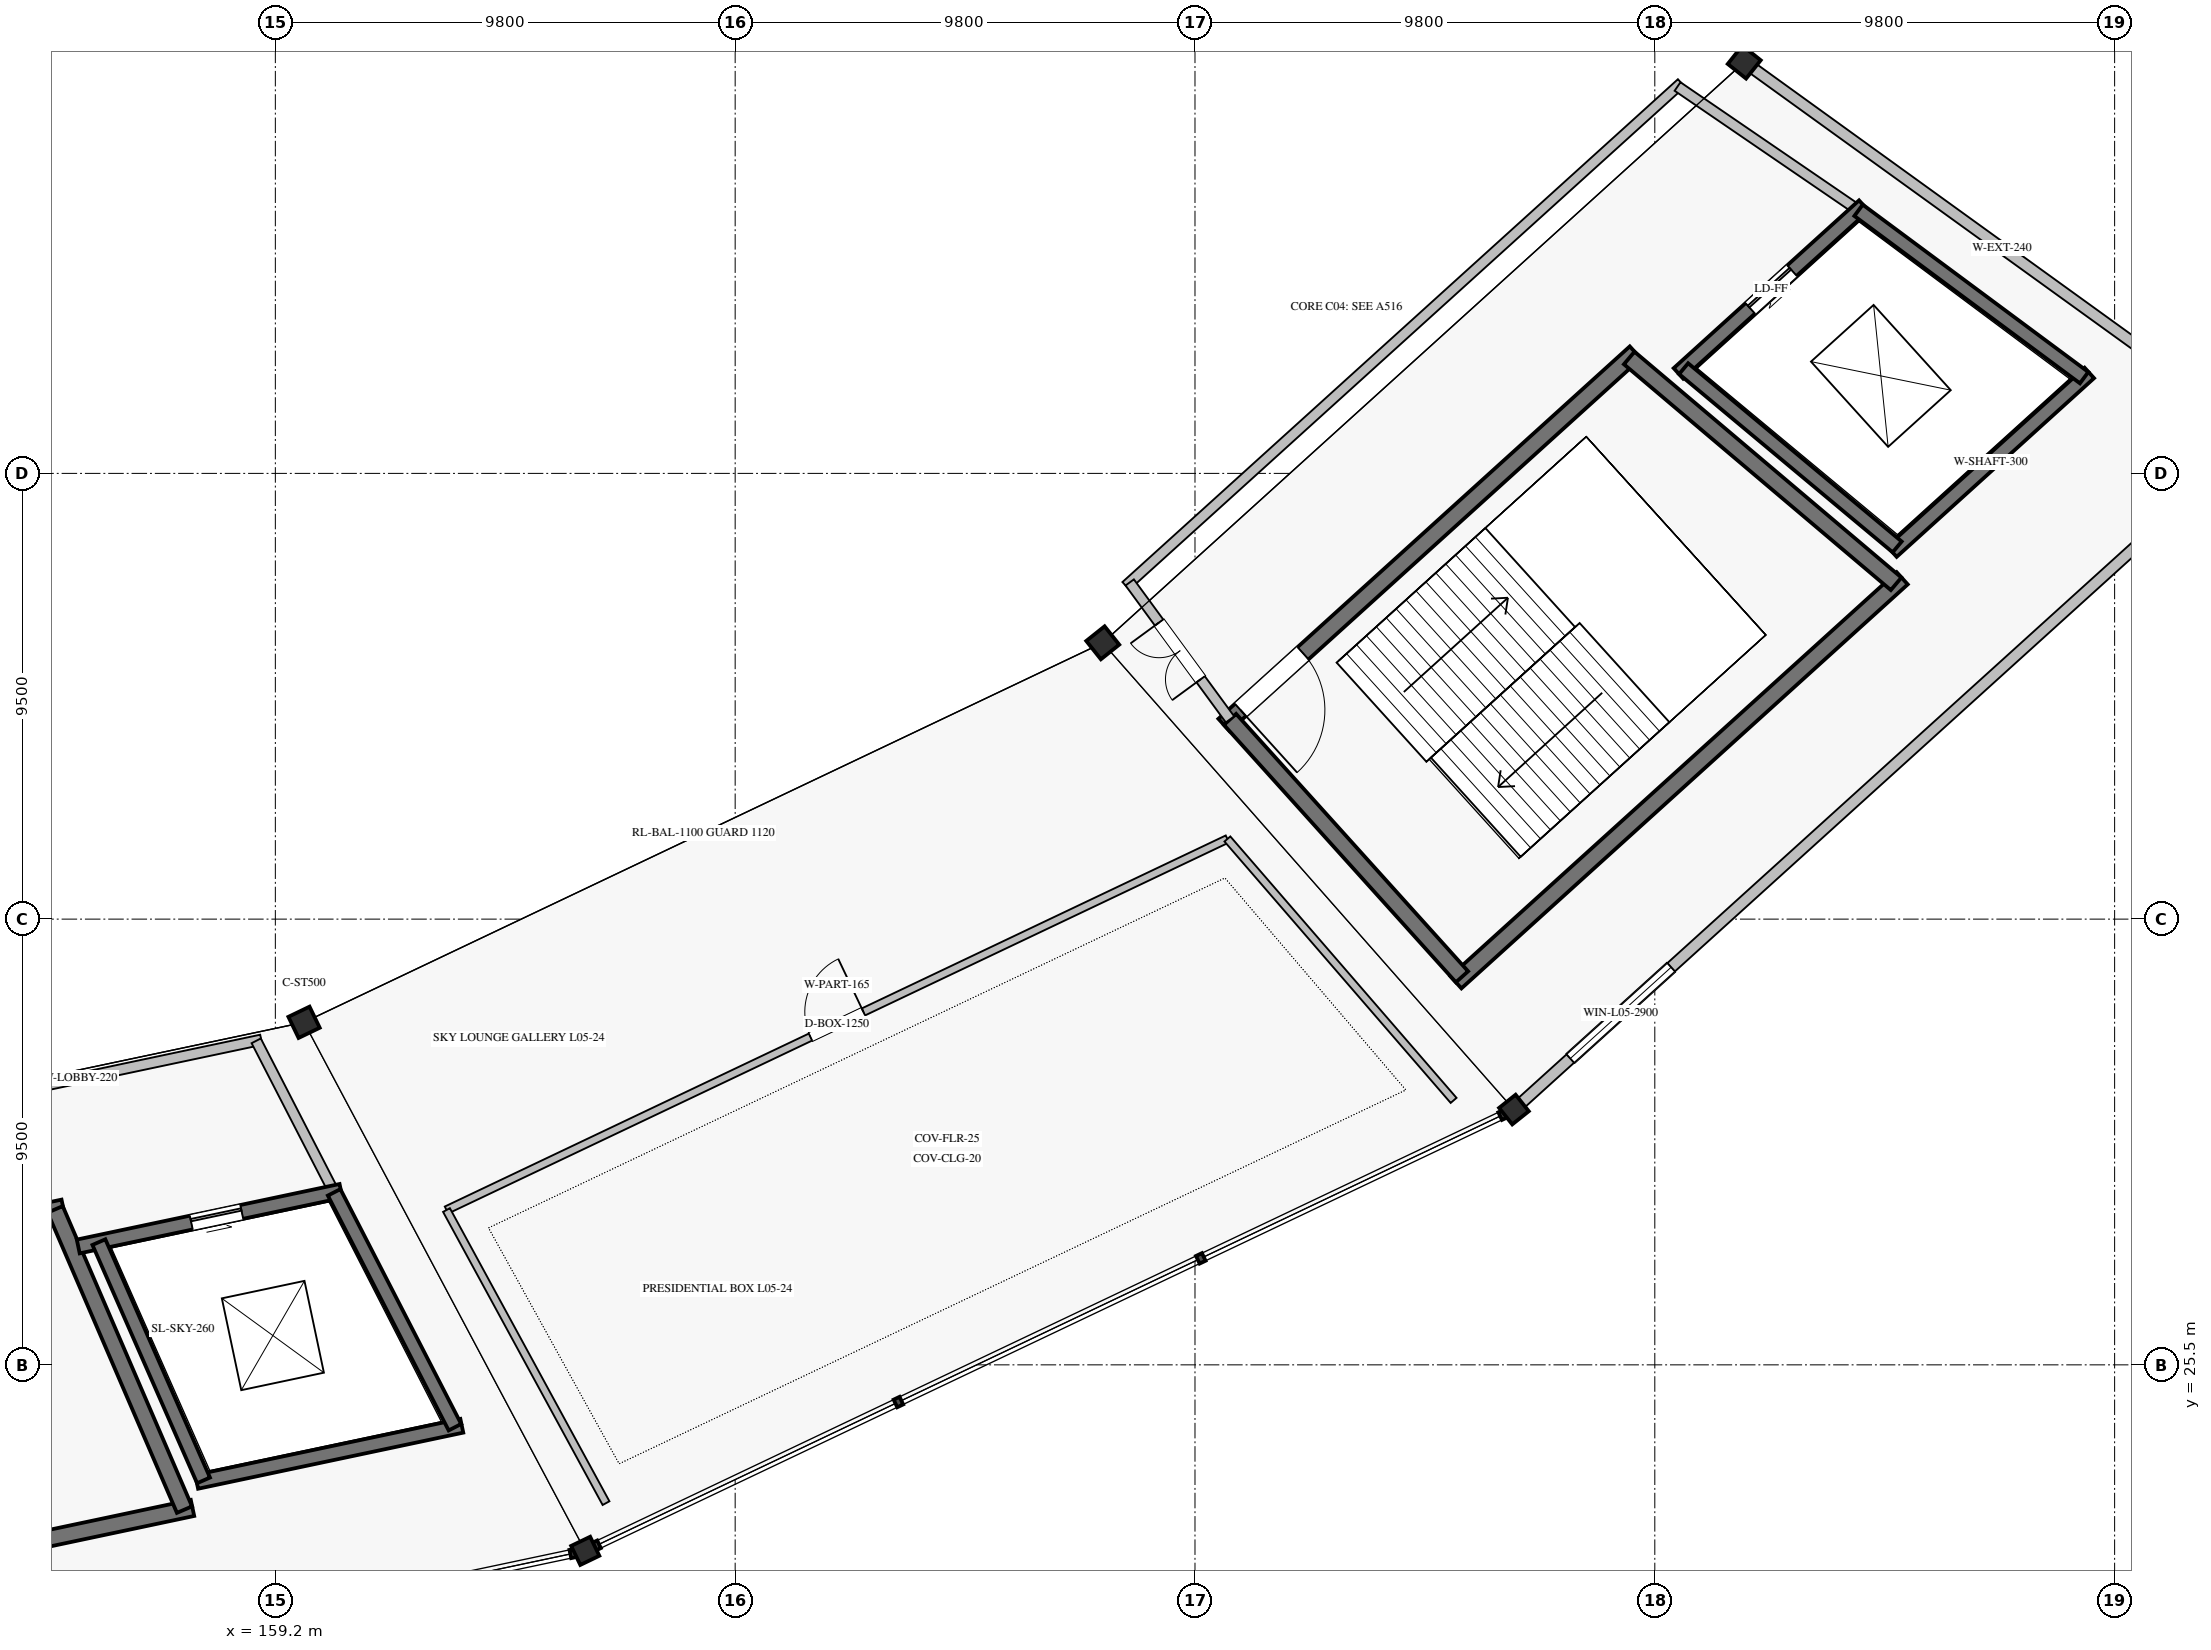
"""IFC4 building model, lengths in metres.
Left out: names, types, materials, properties, quantities, classifications, styles, units other than length and angle.
Written with IfcOpenShell. Run it as: python <this file> out.ifc"""

import sys

from ifc_helpers import new_model, si_unit, direction, frame, frame_2d, origin, origin_2d, place, context, subcontext, project, spatial, rectangle, hollow_rectangle, extrude, element, fill, save


model = new_model("IFC4")
c1 = context("Model", 3, precision=1e-05, world=origin(), true_north=direction((0.0, 1.0)))
c2 = subcontext(c1, "Body", "Model", "MODEL_VIEW")
j1 = project(units=[si_unit("LENGTHUNIT", "METRE"), si_unit("PLANEANGLEUNIT", "RADIAN")], contexts=[c1])
p1 = place(None, origin())
s1 = spatial("IfcSite", under=j1, at=p1, CompositionType="ELEMENT")
p2 = place(p1, origin())
s2 = spatial("IfcBuilding", under=s1, at=p2, CompositionType="ELEMENT")
p3 = place(p2, frame((0.0, 0.0, 25.84)))
s3 = spatial("IfcBuildingStorey", under=s2, at=p3, CompositionType="ELEMENT", Elevation=25.84)
for number, where, z_axis, x_axis in (
    (1, (159.812, 32.801, 0.0), (0.0, 0.0, 1.0), (0.434, -0.901, 0.0)),
    (2, (176.834, 40.889, 0.0), (0.0, 0.0, 1.0), (0.623, -0.782, 0.0)),
    (3, (190.506, 53.266, 0.0), (0.0, 0.0, 1.0), (0.782, -0.623, 0.0)),
):
    element("IfcColumn", number, at=place(p3, frame(where, z_axis=z_axis, x_axis=x_axis)), inside=s3, PredefinedType="COLUMN", context=c2, shape_type="SweptSolid", body=[
        extrude(hollow_rectangle(XDim=0.5, YDim=0.5, WallThickness=0.022, at=origin_2d()), origin(), (0.0, 0.0, 1.0), 5.44),
    ])
for number, where, z_axis, x_axis in (
    (4, (165.805, 21.536, 0.0), (0.0, 0.0, 1.0), (0.434, -0.901, 0.0)),
    (5, (185.598, 30.941, 0.0), (0.0, 0.0, 1.0), (0.623, -0.782, 0.0)),
):
    element("IfcColumn", number, at=place(p3, frame(where, z_axis=z_axis, x_axis=x_axis)), inside=s3, PredefinedType="COLUMN", context=c2, shape_type="SweptSolid", body=[
        extrude(hollow_rectangle(XDim=0.45, YDim=0.45, WallThickness=0.022, at=origin_2d()), origin(), (0.0, 0.0, 1.0), 5.44),
    ])
p4 = place(p3, frame((185.761, 31.089, 0.0), z_axis=(0.0, 0.0, 1.0), x_axis=(0.741349049196, 0.671119651967, 0.0)))
e6 = element("IfcWall", 6, at=p4, inside=s3, PredefinedType="SOLIDWALL", context=c2, shape_type="SweptSolid", body=[
    extrude(rectangle(XDim=21.004, YDim=0.24, at=frame_2d((10.502, 0.0))), origin(), (0.0, 0.0, 1.0), 4.53),
])
p5 = place(p4, frame((1.4, 0.0, 1.0)))
e7 = element("IfcOpeningElement", 7, at=p5, cuts=e6, PredefinedType="OPENING", context=c2, shape_type="SweptSolid", body=[
    extrude(rectangle(XDim=2.9, YDim=2.05, at=frame_2d((1.45, 1.025))), frame((0.0, 0.13, 0.0), z_axis=(0.0, -1.0, 0.0), x_axis=(1.0, 0.0, 0.0)), (0.0, 0.0, 1.0), 0.26),
])
p6 = place(p3, frame((190.684, 53.137, 0.0), z_axis=(0.0, 0.0, 1.0), x_axis=(0.810798505274, -0.585325365797, 0.0)))
e8 = element("IfcWall", 8, at=p6, inside=s3, PredefinedType="SOLIDWALL", context=c2, shape_type="SweptSolid", body=[
    extrude(rectangle(XDim=13.114, YDim=0.24, at=frame_2d((6.557, 0.0))), origin(), (0.0, 0.0, 1.0), 4.478),
])
p7 = place(p3, frame((142.896, 26.357, 0.0), z_axis=(0.0, 0.0, 1.0), x_axis=(0.978345203961, 0.206979858648, 0.0)))
e9 = element("IfcWall", 9, at=p7, inside=s3, PredefinedType="SHEAR", context=c2, shape_type="SweptSolid", body=[
    extrude(rectangle(XDim=12.044, YDim=0.35, at=frame_2d((6.022, 0.0))), origin(), (0.0, 0.0, 1.0), 5.18),
])
p8 = place(p7, frame((0.475, 0.0, 0.0)))
e10 = element("IfcOpeningElement", 10, at=p8, cuts=e9, PredefinedType="OPENING", context=c2, shape_type="SweptSolid", body=[
    extrude(rectangle(XDim=1.8, YDim=2.2, at=frame_2d((0.9, 1.1))), frame((0.0, 0.185, 0.0), z_axis=(0.0, -1.0, 0.0), x_axis=(1.0, 0.0, 0.0)), (0.0, 0.0, 1.0), 0.37),
])
p9 = place(p3, frame((144.65, 19.746, 0.0), z_axis=(0.0, 0.0, 1.0), x_axis=(0.978345119536, 0.206980257705, 0.0)))
e11 = element("IfcWall", 11, at=p9, inside=s3, PredefinedType="SHEAR", context=c2, shape_type="SweptSolid", body=[
    extrude(rectangle(XDim=13.067, YDim=0.35, at=frame_2d((6.533, 0.0))), origin(), (0.0, 0.0, 1.0), 5.18),
])
p10 = place(p3, frame((154.508, 28.814, 0.0), z_axis=(0.0, 0.0, 1.0), x_axis=(0.395453834155, -0.918485854574, 0.0)))
e12 = element("IfcWall", 12, at=p10, inside=s3, PredefinedType="SHEAR", context=c2, shape_type="SweptSolid", body=[
    extrude(rectangle(XDim=6.968, YDim=0.35, at=frame_2d((3.484, 0.0))), origin(), (0.0, 0.0, 1.0), 5.18),
])
p11 = place(p3, frame((154.999, 28.023, 0.0), z_axis=(0.0, 0.0, 1.0), x_axis=(0.978345218992, 0.206979787601, 0.0)))
e13 = element("IfcWall", 13, at=p11, inside=s3, PredefinedType="SHEAR", context=c2, shape_type="SweptSolid", body=[
    extrude(rectangle(XDim=5.724, YDim=0.3, at=frame_2d((2.862, 0.0))), origin(), (0.0, 0.0, 1.0), 5.18),
])
p12 = place(p11, frame((2.462, 0.0, 0.0)))
e14 = element("IfcOpeningElement", 14, at=p12, cuts=e13, PredefinedType="OPENING", context=c2, shape_type="SweptSolid", body=[
    extrude(rectangle(XDim=1.1, YDim=2.2, at=frame_2d((0.55, 1.1))), frame((0.0, 0.16, 0.0), z_axis=(0.0, -1.0, 0.0), x_axis=(1.0, 0.0, 0.0)), (0.0, 0.0, 1.0), 0.32),
])
p13 = place(p3, frame((157.523, 23.006, 0.0), z_axis=(0.0, 0.0, 1.0), x_axis=(0.978347069901, 0.206971038591, 0.0)))
e15 = element("IfcWall", 15, at=p13, inside=s3, PredefinedType="SHEAR", context=c2, shape_type="SweptSolid", body=[
    extrude(rectangle(XDim=5.776, YDim=0.3, at=frame_2d((2.888, 0.0))), origin(), (0.0, 0.0, 1.0), 5.18),
])
p14 = place(p3, frame((155.44, 28.116, 0.0), z_axis=(0.0, 0.0, 1.0), x_axis=(0.402005363577, -0.915637312289, 0.0)))
e16 = element("IfcWall", 16, at=p14, inside=s3, PredefinedType="SHEAR", context=c2, shape_type="SweptSolid", body=[
    extrude(rectangle(XDim=5.547, YDim=0.3, at=frame_2d((2.773, 0.0))), origin(), (0.0, 0.0, 1.0), 5.18),
])
p15 = place(p3, frame((160.453, 29.177, 0.0), z_axis=(0.0, 0.0, 1.0), x_axis=(0.457368592987, -0.889277217829, 0.0)))
e17 = element("IfcWall", 17, at=p15, inside=s3, PredefinedType="SHEAR", context=c2, shape_type="SweptSolid", body=[
    extrude(rectangle(XDim=5.629, YDim=0.3, at=frame_2d((2.814, 0.0))), origin(), (0.0, 0.0, 1.0), 5.18),
])
p16 = place(p3, frame((142.284, 28.914, 0.0), z_axis=(0.0, 0.0, 1.0), x_axis=(0.97834522483, 0.206979760008, 0.0)))
e18 = element("IfcWall", 18, at=p16, inside=s3, PredefinedType="SOLIDWALL", context=c2, shape_type="SweptSolid", body=[
    extrude(rectangle(XDim=16.983, YDim=0.22, at=frame_2d((8.491, 0.0))), origin(), (0.0, 0.0, 1.0), 5.18),
])
p17 = place(p3, frame((158.792, 32.406, 0.0), z_axis=(0.0, 0.0, 1.0), x_axis=(0.457349531643, -0.889287021105, 0.0)))
e19 = element("IfcWall", 19, at=p17, inside=s3, PredefinedType="SOLIDWALL", context=c2, shape_type="SweptSolid", body=[
    extrude(rectangle(XDim=3.632, YDim=0.22, at=frame_2d((1.816, 0.0))), origin(), (0.0, 0.0, 1.0), 5.18),
])
p18 = place(p3, frame((179.417, 39.14, 0.0), z_axis=(0.0, 0.0, 1.0), x_axis=(0.741348929385, 0.671119784315, 0.0)))
e20 = element("IfcWall", 20, at=p18, inside=s3, PredefinedType="SHEAR", context=c2, shape_type="SweptSolid", body=[
    extrude(rectangle(XDim=11.826, YDim=0.35, at=frame_2d((5.913, 0.0))), origin(), (0.0, 0.0, 1.0), 5.18),
])
p19 = place(p18, frame((0.475, 0.0, 0.0)))
e21 = element("IfcOpeningElement", 21, at=p19, cuts=e20, PredefinedType="OPENING", context=c2, shape_type="SweptSolid", body=[
    extrude(rectangle(XDim=1.8, YDim=2.2, at=frame_2d((0.9, 1.1))), frame((0.0, 0.185, 0.0), z_axis=(0.0, -1.0, 0.0), x_axis=(1.0, 0.0, 0.0)), (0.0, 0.0, 1.0), 0.37),
])
p20 = place(p3, frame((184.361, 33.653, 0.0), z_axis=(0.0, 0.0, 1.0), x_axis=(0.741351373721, 0.671117084183, 0.0)))
e22 = element("IfcWall", 22, at=p20, inside=s3, PredefinedType="SHEAR", context=c2, shape_type="SweptSolid", body=[
    extrude(rectangle(XDim=12.83, YDim=0.35, at=frame_2d((6.415, 0.0))), origin(), (0.0, 0.0, 1.0), 5.18),
])
p21 = place(p3, frame((179.546, 39.257, 0.0), z_axis=(0.0, 0.0, 1.0), x_axis=(0.669463145673, -0.742845270958, 0.0)))
e23 = element("IfcWall", 23, at=p21, inside=s3, PredefinedType="SHEAR", context=c2, shape_type="SweptSolid", body=[
    extrude(rectangle(XDim=7.386, YDim=0.35, at=frame_2d((3.693, 0.0))), origin(), (0.0, 0.0, 1.0), 5.18),
])
p22 = place(p3, frame((188.055, 46.959, 0.0), z_axis=(0.0, 0.0, 1.0), x_axis=(0.763422324031, -0.64589964791, 0.0)))
e24 = element("IfcWall", 24, at=p22, inside=s3, PredefinedType="SHEAR", context=c2, shape_type="SweptSolid", body=[
    extrude(rectangle(XDim=7.452, YDim=0.35, at=frame_2d((3.726, 0.0))), origin(), (0.0, 0.0, 1.0), 5.18),
])
p23 = place(p3, frame((189.103, 46.631, 0.0), z_axis=(0.0, 0.0, 1.0), x_axis=(0.741350155641, 0.671118429736, 0.0)))
e25 = element("IfcWall", 25, at=p23, inside=s3, PredefinedType="SHEAR", context=c2, shape_type="SweptSolid", body=[
    extrude(rectangle(XDim=5.329, YDim=0.3, at=frame_2d((2.665, 0.0))), origin(), (0.0, 0.0, 1.0), 5.18),
])
p24 = place(p23, frame((2.065, 0.0, 0.0)))
e26 = element("IfcOpeningElement", 26, at=p24, cuts=e25, PredefinedType="OPENING", context=c2, shape_type="SweptSolid", body=[
    extrude(rectangle(XDim=1.2, YDim=2.2, at=frame_2d((0.6, 1.1))), frame((0.0, 0.16, 0.0), z_axis=(0.0, -1.0, 0.0), x_axis=(1.0, 0.0, 0.0)), (0.0, 0.0, 1.0), 0.32),
])
p25 = place(p3, frame((193.654, 42.832, 0.0), z_axis=(0.0, 0.0, 1.0), x_axis=(0.74134208775, 0.671127341815, 0.0)))
e27 = element("IfcWall", 27, at=p25, inside=s3, PredefinedType="SHEAR", context=c2, shape_type="SweptSolid", body=[
    extrude(rectangle(XDim=5.675, YDim=0.3, at=frame_2d((2.837, 0.0))), origin(), (0.0, 0.0, 1.0), 5.18),
])
p26 = place(p3, frame((189.214, 46.732, 0.0), z_axis=(0.0, 0.0, 1.0), x_axis=(0.767711354146, -0.640795815151, 0.0)))
e28 = element("IfcWall", 28, at=p26, inside=s3, PredefinedType="SHEAR", context=c2, shape_type="SweptSolid", body=[
    extrude(rectangle(XDim=5.929, YDim=0.3, at=frame_2d((2.964, 0.0))), origin(), (0.0, 0.0, 1.0), 5.18),
])
p27 = place(p3, frame((192.942, 50.107, 0.0), z_axis=(0.0, 0.0, 1.0), x_axis=(0.803101805449, -0.59584183311, 0.0)))
e29 = element("IfcWall", 29, at=p27, inside=s3, PredefinedType="SHEAR", context=c2, shape_type="SweptSolid", body=[
    extrude(rectangle(XDim=5.986, YDim=0.3, at=frame_2d((2.993, 0.0))), origin(), (0.0, 0.0, 1.0), 5.18),
])
p28 = place(p3, frame((177.327, 42.102, 0.0), z_axis=(0.0, 0.0, 1.0), x_axis=(0.741351035574, 0.671117457717, 0.0)))
e30 = element("IfcWall", 30, at=p28, inside=s3, PredefinedType="SOLIDWALL", context=c2, shape_type="SweptSolid", body=[
    extrude(rectangle(XDim=15.969, YDim=0.22, at=frame_2d((7.985, 0.0))), origin(), (0.0, 0.0, 1.0), 5.18),
])
p29 = place(p3, frame((177.409, 42.176, 0.0), z_axis=(0.0, 0.0, 1.0), x_axis=(0.590836915359, -0.806791013491, 0.0)))
e31 = element("IfcWall", 31, at=p29, inside=s3, PredefinedType="SOLIDWALL", context=c2, shape_type="SweptSolid", body=[
    extrude(rectangle(XDim=3.618, YDim=0.22, at=frame_2d((1.809, 0.0))), origin(), (0.0, 0.0, 1.0), 5.18),
])
p30 = place(p29, frame((1.059, 0.0, 0.0)))
e32 = element("IfcOpeningElement", 32, at=p30, cuts=e31, PredefinedType="OPENING", context=c2, shape_type="SweptSolid", body=[
    extrude(rectangle(XDim=1.5, YDim=2.2, at=frame_2d((0.75, 1.1))), frame((0.0, 0.12, 0.0), z_axis=(0.0, -1.0, 0.0), x_axis=(1.0, 0.0, 0.0)), (0.0, 0.0, 1.0), 0.24),
])
p31 = place(p3, frame((189.085, 52.746, 0.0), z_axis=(0.0, 0.0, 1.0), x_axis=(0.825385410642, -0.564569680287, 0.0)))
e33 = element("IfcWall", 33, at=p31, inside=s3, PredefinedType="SOLIDWALL", context=c2, shape_type="SweptSolid", body=[
    extrude(rectangle(XDim=4.674, YDim=0.22, at=frame_2d((2.337, 0.0))), origin(), (0.0, 0.0, 1.0), 5.18),
])
p32 = place(p3, frame((162.847, 28.8, 0.0), z_axis=(0.0, 0.0, 1.0), x_axis=(0.90321677741, 0.429184637429, 0.0)))
e34 = element("IfcWall", 34, at=p32, inside=s3, PredefinedType="PARTITIONING", context=c2, shape_type="SweptSolid", body=[
    extrude(rectangle(XDim=18.427, YDim=0.165, at=frame_2d((9.214, 0.0))), origin(), (0.0, 0.0, 1.0), 4.5),
])
p33 = place(p32, frame((8.589, 0.0, 0.0)))
e35 = element("IfcOpeningElement", 35, at=p33, cuts=e34, PredefinedType="OPENING", context=c2, shape_type="SweptSolid", body=[
    extrude(rectangle(XDim=1.25, YDim=2.25, at=frame_2d((0.625, 1.125))), frame((0.0, 0.093, 0.0), z_axis=(0.0, -1.0, 0.0), x_axis=(1.0, 0.0, 0.0)), (0.0, 0.0, 1.0), 0.185),
])
p34 = place(p3, frame((162.847, 28.8, 0.0), z_axis=(0.0, 0.0, 1.0), x_axis=(0.47812325427, -0.878292749444, 0.0)))
e36 = element("IfcWall", 36, at=p34, inside=s3, PredefinedType="PARTITIONING", context=c2, shape_type="SweptSolid", body=[
    extrude(rectangle(XDim=7.113, YDim=0.165, at=frame_2d((3.556, 0.0))), origin(), (0.0, 0.0, 1.0), 4.5),
])
p35 = place(p3, frame((179.491, 36.708, 0.0), z_axis=(0.0, 0.0, 1.0), x_axis=(0.654288201841, -0.7562452968, 0.0)))
e37 = element("IfcWall", 37, at=p35, inside=s3, PredefinedType="PARTITIONING", context=c2, shape_type="SweptSolid", body=[
    extrude(rectangle(XDim=7.368, YDim=0.165, at=frame_2d((3.684, 0.0))), origin(), (0.0, 0.0, 1.0), 4.5),
])
p36 = place(p5, origin())
e38 = element("IfcWindow", 38, at=p36, inside=s3, PartitioningType="SINGLE_PANEL", PredefinedType="WINDOW", context=c2, shape_type="SweptSolid", body=[
    extrude(rectangle(XDim=2.9, YDim=2.05, at=frame_2d((1.45, 1.025))), frame((0.0, 0.03, 0.0), z_axis=(0.0, -1.0, 0.0), x_axis=(1.0, 0.0, 0.0)), (0.0, 0.0, 1.0), 0.06),
])
fill(e7, e38)
p37 = place(p12, origin())
e39 = element("IfcDoor", 39, at=p37, inside=s3, OperationType="SLIDING_TO_RIGHT", PredefinedType="DOOR", context=c2, shape_type="SweptSolid", body=[
    extrude(rectangle(XDim=1.1, YDim=2.2, at=frame_2d((0.55, 1.1))), frame((0.0, 0.025, 0.0), z_axis=(0.0, -1.0, 0.0), x_axis=(1.0, 0.0, 0.0)), (0.0, 0.0, 1.0), 0.05),
])
fill(e14, e39)
p38 = place(p19, frame((1.8, 0.0, 0.0), z_axis=(0.0, 0.0, 1.0), x_axis=(-1.0, 0.0, 0.0)))
e40 = element("IfcDoor", 40, at=p38, inside=s3, OperationType="SINGLE_SWING_RIGHT", PredefinedType="DOOR", context=c2, shape_type="SweptSolid", body=[
    extrude(rectangle(XDim=1.8, YDim=2.2, at=frame_2d((0.9, 1.1))), frame((0.0, 0.025, 0.0), z_axis=(0.0, -1.0, 0.0), x_axis=(1.0, 0.0, 0.0)), (0.0, 0.0, 1.0), 0.05),
])
fill(e21, e40)
p39 = place(p24, origin())
e41 = element("IfcDoor", 41, at=p39, inside=s3, OperationType="SLIDING_TO_LEFT", PredefinedType="DOOR", context=c2, shape_type="SweptSolid", body=[
    extrude(rectangle(XDim=1.2, YDim=2.2, at=frame_2d((0.6, 1.1))), frame((0.0, 0.025, 0.0), z_axis=(0.0, -1.0, 0.0), x_axis=(1.0, 0.0, 0.0)), (0.0, 0.0, 1.0), 0.05),
])
fill(e26, e41)
p40 = place(p30, frame((1.5, 0.0, 0.0), z_axis=(0.0, 0.0, 1.0), x_axis=(-1.0, 0.0, 0.0)))
e42 = element("IfcDoor", 42, at=p40, inside=s3, OperationType="DOUBLE_DOOR_SINGLE_SWING", PredefinedType="DOOR", context=c2, shape_type="SweptSolid", body=[
    extrude(rectangle(XDim=1.5, YDim=2.2, at=frame_2d((0.75, 1.1))), frame((0.0, 0.025, 0.0), z_axis=(0.0, -1.0, 0.0), x_axis=(1.0, 0.0, 0.0)), (0.0, 0.0, 1.0), 0.05),
])
fill(e32, e42)
p41 = place(p33, origin())
e43 = element("IfcDoor", 43, at=p41, inside=s3, OperationType="SINGLE_SWING_RIGHT", PredefinedType="DOOR", context=c2, shape_type="SweptSolid", body=[
    extrude(rectangle(XDim=1.25, YDim=2.25, at=frame_2d((0.625, 1.125))), frame((0.0, 0.025, 0.0), z_axis=(0.0, -1.0, 0.0), x_axis=(1.0, 0.0, 0.0)), (0.0, 0.0, 1.0), 0.05),
])
fill(e35, e43)
save(model, sys.argv[1])
